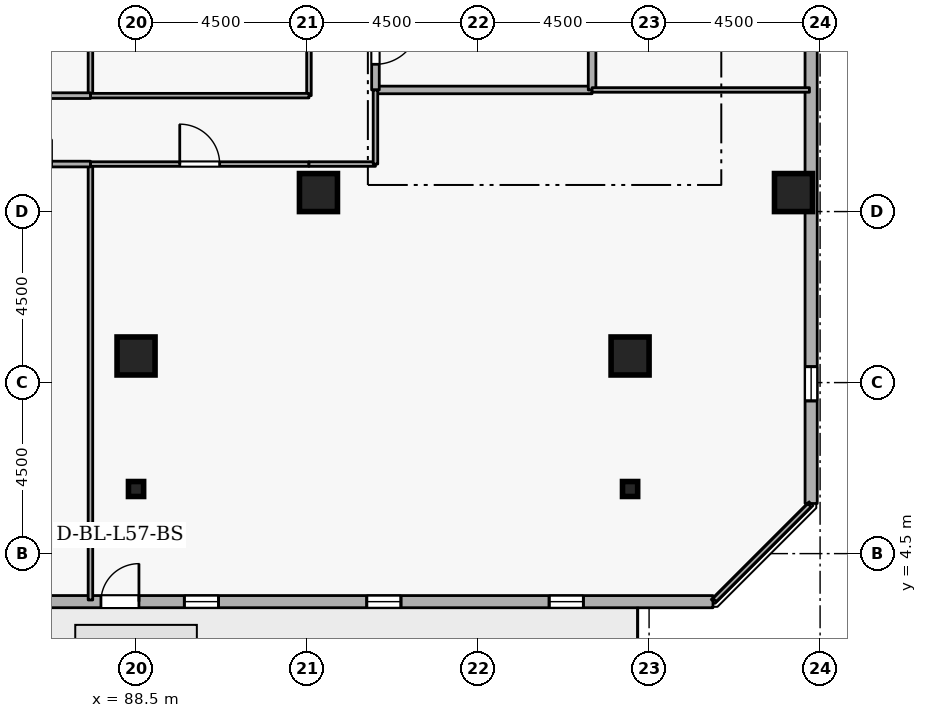
"""IFC4 building model, lengths in metres.
Left out: names, types, materials, properties, quantities, classifications, styles, units other than length and angle.
Written with IfcOpenShell. Run it as: python <this file> out.ifc"""

import sys

from ifc_helpers import new_model, si_unit, direction, frame, frame_2d, origin, origin_2d, place, context, subcontext, project, spatial, rectangle, i_section, extrude, element, fill, save


model = new_model("IFC4")
c1 = context("Model", 3, precision=1e-05, world=origin(), true_north=direction((0.0, 1.0)))
c2 = subcontext(c1, "Body", "Model", "MODEL_VIEW")
j1 = project(units=[si_unit("LENGTHUNIT", "METRE"), si_unit("PLANEANGLEUNIT", "RADIAN")], contexts=[c1])
p1 = place(None, origin())
s1 = spatial("IfcSite", under=j1, at=p1, CompositionType="ELEMENT")
p2 = place(p1, origin())
s2 = spatial("IfcBuilding", under=s1, at=p2, CompositionType="ELEMENT")
p3 = place(p2, frame((0.0, 0.0, 214.5)))
s3 = spatial("IfcBuildingStorey", under=s2, at=p3, CompositionType="ELEMENT", Elevation=214.5)
for number, where, z_axis, x_axis in (
    (1, (105.8, 14.0, 0.0), (0.0, 0.0, 1.0), (1.0, 0.0, 0.0)),
    (2, (101.5, 9.7, 0.0), (0.0, 0.0, 1.0), (1.0, 0.0, 0.0)),
    (3, (88.5, 9.7, 0.0), (0.0, 0.0, 1.0), (1.0, 0.0, 0.0)),
    (4, (93.3, 14.0, 0.0), (0.0, 0.0, 1.0), (1.0, 0.0, 0.0)),
):
    element("IfcColumn", number, at=place(p3, frame(where, z_axis=z_axis, x_axis=x_axis)), inside=s3, PredefinedType="COLUMN", context=c2, shape_type="SweptSolid", body=[
        extrude(rectangle(XDim=1.0, YDim=1.0, at=origin_2d()), origin(), (0.0, 0.0, 1.0), 3.6),
    ])
for number, where, z_axis, x_axis in (
    (5, (101.5, 6.2, 0.0), (0.0, 0.0, 1.0), (1.0, 0.0, 0.0)),
    (6, (88.5, 6.2, 0.0), (0.0, 0.0, 1.0), (1.0, 0.0, 0.0)),
):
    element("IfcColumn", number, at=place(p3, frame(where, z_axis=z_axis, x_axis=x_axis)), inside=s3, PredefinedType="COLUMN", context=c2, shape_type="SweptSolid", body=[
        extrude(i_section(OverallWidth=0.399, OverallDepth=0.394, WebThickness=0.023, FlangeThickness=0.037, FilletRadius=0.015, at=origin_2d()), origin(), (0.0, 0.0, 1.0), 3.6),
    ])
p4 = place(p3, frame((67.871, 3.237, 0.0), z_axis=(0.0, 0.0, 1.0), x_axis=(0.999999998513, -5.4540124e-05, 0.0)))
e7 = element("IfcWall", 7, at=p4, inside=s3, PredefinedType="STANDARD", context=c2, shape_type="SweptSolid", body=[
    extrude(rectangle(XDim=35.811, YDim=0.32, at=frame_2d((17.905, 0.0))), origin(), (0.0, 0.0, 1.0), 2.7),
])
p5 = place(p4, frame((19.706, 0.0, 0.0)))
e8 = element("IfcOpeningElement", 8, at=p5, cuts=e7, PredefinedType="OPENING", context=c2, shape_type="SweptSolid", body=[
    extrude(rectangle(XDim=1.0, YDim=2.08, at=frame_2d((0.5, 1.04))), frame((0.0, 0.17, 0.0), z_axis=(0.0, -1.0, 0.0), x_axis=(1.0, 0.0, 0.0)), (0.0, 0.0, 1.0), 0.34),
])
p6 = place(p4, frame((2.7, 0.0, 0.72)))
e9 = element("IfcOpeningElement", 9, at=p6, cuts=e7, PredefinedType="OPENING", context=c2, shape_type="SweptSolid", body=[
    extrude(rectangle(XDim=0.9, YDim=1.75, at=frame_2d((0.45, 0.875))), frame((0.0, 0.17, 0.0), z_axis=(0.0, -1.0, 0.0), x_axis=(1.0, 0.0, 0.0)), (0.0, 0.0, 1.0), 0.34),
])
p7 = place(p4, frame((7.5, 0.0, 0.72)))
e10 = element("IfcOpeningElement", 10, at=p7, cuts=e7, PredefinedType="OPENING", context=c2, shape_type="SweptSolid", body=[
    extrude(rectangle(XDim=0.9, YDim=1.75, at=frame_2d((0.45, 0.875))), frame((0.0, 0.17, 0.0), z_axis=(0.0, -1.0, 0.0), x_axis=(1.0, 0.0, 0.0)), (0.0, 0.0, 1.0), 0.34),
])
p8 = place(p4, frame((12.3, 0.0, 0.72)))
e11 = element("IfcOpeningElement", 11, at=p8, cuts=e7, PredefinedType="OPENING", context=c2, shape_type="SweptSolid", body=[
    extrude(rectangle(XDim=0.9, YDim=1.75, at=frame_2d((0.45, 0.875))), frame((0.0, 0.17, 0.0), z_axis=(0.0, -1.0, 0.0), x_axis=(1.0, 0.0, 0.0)), (0.0, 0.0, 1.0), 0.34),
])
p9 = place(p4, frame((17.1, 0.0, 0.72)))
e12 = element("IfcOpeningElement", 12, at=p9, cuts=e7, PredefinedType="OPENING", context=c2, shape_type="SweptSolid", body=[
    extrude(rectangle(XDim=0.9, YDim=1.75, at=frame_2d((0.45, 0.875))), frame((0.0, 0.17, 0.0), z_axis=(0.0, -1.0, 0.0), x_axis=(1.0, 0.0, 0.0)), (0.0, 0.0, 1.0), 0.34),
])
p10 = place(p4, frame((21.9, 0.0, 0.72)))
e13 = element("IfcOpeningElement", 13, at=p10, cuts=e7, PredefinedType="OPENING", context=c2, shape_type="SweptSolid", body=[
    extrude(rectangle(XDim=0.9, YDim=1.75, at=frame_2d((0.45, 0.875))), frame((0.0, 0.17, 0.0), z_axis=(0.0, -1.0, 0.0), x_axis=(1.0, 0.0, 0.0)), (0.0, 0.0, 1.0), 0.34),
])
p11 = place(p4, frame((26.7, 0.0, 0.72)))
e14 = element("IfcOpeningElement", 14, at=p11, cuts=e7, PredefinedType="OPENING", context=c2, shape_type="SweptSolid", body=[
    extrude(rectangle(XDim=0.9, YDim=1.75, at=frame_2d((0.45, 0.875))), frame((0.0, 0.17, 0.0), z_axis=(0.0, -1.0, 0.0), x_axis=(1.0, 0.0, 0.0)), (0.0, 0.0, 1.0), 0.34),
])
p12 = place(p4, frame((31.5, 0.0, 0.72)))
e15 = element("IfcOpeningElement", 15, at=p12, cuts=e7, PredefinedType="OPENING", context=c2, shape_type="SweptSolid", body=[
    extrude(rectangle(XDim=0.9, YDim=1.75, at=frame_2d((0.45, 0.875))), frame((0.0, 0.17, 0.0), z_axis=(0.0, -1.0, 0.0), x_axis=(1.0, 0.0, 0.0)), (0.0, 0.0, 1.0), 0.34),
])
p13 = place(p3, frame((106.265, 5.819, 0.0), z_axis=(0.0, 0.0, 1.0), x_axis=(-5.4540124e-05, 0.999999998513, 0.0)))
e16 = element("IfcWall", 16, at=p13, inside=s3, PredefinedType="STANDARD", context=c2, shape_type="SweptSolid", body=[
    extrude(rectangle(XDim=35.811, YDim=0.32, at=frame_2d((17.905, 0.0))), origin(), (0.0, 0.0, 1.0), 2.7),
])
p14 = place(p13, frame((2.7, 0.0, 0.72)))
e17 = element("IfcOpeningElement", 17, at=p14, cuts=e16, PredefinedType="OPENING", context=c2, shape_type="SweptSolid", body=[
    extrude(rectangle(XDim=0.9, YDim=1.75, at=frame_2d((0.45, 0.875))), frame((0.0, 0.17, 0.0), z_axis=(0.0, -1.0, 0.0), x_axis=(1.0, 0.0, 0.0)), (0.0, 0.0, 1.0), 0.34),
])
p15 = place(p13, frame((12.3, 0.0, 0.72)))
e18 = element("IfcOpeningElement", 18, at=p15, cuts=e16, PredefinedType="OPENING", context=c2, shape_type="SweptSolid", body=[
    extrude(rectangle(XDim=0.9, YDim=1.75, at=frame_2d((0.45, 0.875))), frame((0.0, 0.17, 0.0), z_axis=(0.0, -1.0, 0.0), x_axis=(1.0, 0.0, 0.0)), (0.0, 0.0, 1.0), 0.34),
])
p16 = place(p13, frame((17.1, 0.0, 0.72)))
e19 = element("IfcOpeningElement", 19, at=p16, cuts=e16, PredefinedType="OPENING", context=c2, shape_type="SweptSolid", body=[
    extrude(rectangle(XDim=0.9, YDim=1.75, at=frame_2d((0.45, 0.875))), frame((0.0, 0.17, 0.0), z_axis=(0.0, -1.0, 0.0), x_axis=(1.0, 0.0, 0.0)), (0.0, 0.0, 1.0), 0.34),
])
p17 = place(p13, frame((26.7, 0.0, 0.72)))
e20 = element("IfcOpeningElement", 20, at=p17, cuts=e16, PredefinedType="OPENING", context=c2, shape_type="SweptSolid", body=[
    extrude(rectangle(XDim=0.9, YDim=1.75, at=frame_2d((0.45, 0.875))), frame((0.0, 0.17, 0.0), z_axis=(0.0, -1.0, 0.0), x_axis=(1.0, 0.0, 0.0)), (0.0, 0.0, 1.0), 0.34),
])
p18 = place(p13, frame((31.5, 0.0, 0.72)))
e21 = element("IfcOpeningElement", 21, at=p18, cuts=e16, PredefinedType="OPENING", context=c2, shape_type="SweptSolid", body=[
    extrude(rectangle(XDim=0.9, YDim=1.75, at=frame_2d((0.45, 0.875))), frame((0.0, 0.17, 0.0), z_axis=(0.0, -1.0, 0.0), x_axis=(1.0, 0.0, 0.0)), (0.0, 0.0, 1.0), 0.34),
])
p19 = place(p3, frame((94.8, 16.7, 0.0), z_axis=(0.0, 0.0, 1.0), x_axis=(1.0, 0.0, 0.0)))
e22 = element("IfcWall", 22, at=p19, inside=s3, PredefinedType="STANDARD", context=c2, shape_type="SweptSolid", body=[
    extrude(rectangle(XDim=5.7, YDim=0.2, at=frame_2d((2.85, 0.0))), origin(), (0.0, 0.0, 1.0), 3.34),
])
p20 = place(p3, frame((100.5, 16.7, 0.0), z_axis=(0.0, 0.0, 1.0), x_axis=(0.0, 1.0, 0.0)))
e23 = element("IfcWall", 23, at=p20, inside=s3, PredefinedType="STANDARD", context=c2, shape_type="SweptSolid", body=[
    extrude(rectangle(XDim=2.5, YDim=0.2, at=frame_2d((1.25, 0.0))), origin(), (0.0, 0.0, 1.0), 3.34),
])
p21 = place(p3, frame((94.8, 19.2, 0.0), z_axis=(0.0, 0.0, 1.0), x_axis=(0.0, -1.0, 0.0)))
e24 = element("IfcWall", 24, at=p21, inside=s3, PredefinedType="STANDARD", context=c2, shape_type="SweptSolid", body=[
    extrude(rectangle(XDim=2.5, YDim=0.2, at=frame_2d((1.25, 0.0))), origin(), (0.0, 0.0, 1.0), 3.34),
])
p22 = place(p21, frame((0.675, 0.0, 0.0)))
e25 = element("IfcOpeningElement", 25, at=p22, cuts=e24, PredefinedType="OPENING", context=c2, shape_type="SweptSolid", body=[
    extrude(rectangle(XDim=1.15, YDim=2.1, at=frame_2d((0.575, 1.05))), frame((0.0, 0.11, 0.0), z_axis=(0.0, -1.0, 0.0), x_axis=(1.0, 0.0, 0.0)), (0.0, 0.0, 1.0), 0.22),
])
p23 = place(p3, frame((87.3, 3.28, 0.0), z_axis=(0.0, 0.0, 1.0), x_axis=(0.0, 1.0, 0.0)))
e26 = element("IfcWall", 26, at=p23, inside=s3, PredefinedType="PARTITIONING", context=c2, shape_type="SweptSolid", body=[
    extrude(rectangle(XDim=11.47, YDim=0.12, at=frame_2d((5.735, 0.0))), origin(), (0.0, 0.0, 1.0), 3.34),
])
p24 = place(p3, frame((87.3, 14.75, 0.0), z_axis=(0.0, 0.0, 1.0), x_axis=(1.0, 0.0, 0.0)))
e27 = element("IfcWall", 27, at=p24, inside=s3, PredefinedType="PARTITIONING", context=c2, shape_type="SweptSolid", body=[
    extrude(rectangle(XDim=5.75, YDim=0.12, at=frame_2d((2.875, 0.0))), origin(), (0.0, 0.0, 1.0), 3.34),
])
p25 = place(p24, frame((2.35, 0.0, 0.0)))
e28 = element("IfcOpeningElement", 28, at=p25, cuts=e27, PredefinedType="OPENING", context=c2, shape_type="SweptSolid", body=[
    extrude(rectangle(XDim=1.05, YDim=2.1, at=frame_2d((0.525, 1.05))), frame((0.0, 0.07, 0.0), z_axis=(0.0, -1.0, 0.0), x_axis=(1.0, 0.0, 0.0)), (0.0, 0.0, 1.0), 0.14),
])
p26 = place(p3, frame((93.05, 14.75, 0.0), z_axis=(0.0, 0.0, 1.0), x_axis=(1.0, 0.0, 0.0)))
e29 = element("IfcWall", 29, at=p26, inside=s3, PredefinedType="PARTITIONING", context=c2, shape_type="SweptSolid", body=[
    extrude(rectangle(XDim=1.75, YDim=0.12, at=frame_2d((0.875, 0.0))), origin(), (0.0, 0.0, 1.0), 3.34),
])
p27 = place(p3, frame((94.8, 14.75, 0.0), z_axis=(0.0, 0.0, 1.0), x_axis=(0.0, 1.0, 0.0)))
e30 = element("IfcWall", 30, at=p27, inside=s3, PredefinedType="PARTITIONING", context=c2, shape_type="SweptSolid", body=[
    extrude(rectangle(XDim=1.95, YDim=0.12, at=frame_2d((0.975, 0.0))), origin(), (0.0, 0.0, 1.0), 3.34),
])
p28 = place(p3, frame((100.5, 16.7, 0.0), z_axis=(0.0, 0.0, 1.0), x_axis=(1.0, 0.0, 0.0)))
e31 = element("IfcWall", 31, at=p28, inside=s3, PredefinedType="PARTITIONING", context=c2, shape_type="SweptSolid", body=[
    extrude(rectangle(XDim=5.72, YDim=0.12, at=frame_2d((2.86, 0.0))), origin(), (0.0, 0.0, 1.0), 3.34),
])
p29 = place(p3, frame((106.22, 5.775, 0.0), z_axis=(0.0, 0.0, 1.0), x_axis=(-0.707106781187, -0.707106781187, 0.0)))
e32 = element("IfcWall", 32, at=p29, inside=s3, PredefinedType="PARTITIONING", context=c2, shape_type="SweptSolid", body=[
    extrude(rectangle(XDim=3.528, YDim=0.12, at=frame_2d((1.764, 0.0))), origin(), (0.0, 0.0, 1.0), 3.34),
])
p30 = place(p3, frame((83.95, 14.75, 0.0), z_axis=(0.0, 0.0, 1.0), x_axis=(1.0, 0.0, 0.0)))
e33 = element("IfcWall", 33, at=p30, inside=s3, PredefinedType="PARTITIONING", context=c2, shape_type="SweptSolid", body=[
    extrude(rectangle(XDim=3.35, YDim=0.15, at=frame_2d((1.675, 0.0))), origin(), (0.0, 0.0, 1.0), 3.34),
])
p31 = place(p30, frame((1.025, 0.0, 0.0)))
e34 = element("IfcOpeningElement", 34, at=p31, cuts=e33, PredefinedType="OPENING", context=c2, shape_type="SweptSolid", body=[
    extrude(rectangle(XDim=1.3, YDim=2.12, at=frame_2d((0.65, 1.06))), frame((0.0, 0.085, 0.0), z_axis=(0.0, -1.0, 0.0), x_axis=(1.0, 0.0, 0.0)), (0.0, 0.0, 1.0), 0.17),
])
p32 = place(p3, frame((87.3, 16.55, 0.0), z_axis=(0.0, 0.0, 1.0), x_axis=(0.0, 1.0, 0.0)))
e35 = element("IfcWall", 35, at=p32, inside=s3, PredefinedType="PARTITIONING", context=c2, shape_type="SweptSolid", body=[
    extrude(rectangle(XDim=5.85, YDim=0.12, at=frame_2d((2.925, 0.0))), origin(), (0.0, 0.0, 1.0), 3.34),
])
p33 = place(p3, frame((93.05, 22.4, 0.0), z_axis=(0.0, 0.0, 1.0), x_axis=(0.0, -1.0, 0.0)))
e36 = element("IfcWall", 36, at=p33, inside=s3, PredefinedType="PARTITIONING", context=c2, shape_type="SweptSolid", body=[
    extrude(rectangle(XDim=5.85, YDim=0.12, at=frame_2d((2.925, 0.0))), origin(), (0.0, 0.0, 1.0), 3.34),
])
p34 = place(p33, frame((2.45, 0.0, 0.0)))
e37 = element("IfcOpeningElement", 37, at=p34, cuts=e36, PredefinedType="OPENING", context=c2, shape_type="SweptSolid", body=[
    extrude(rectangle(XDim=0.95, YDim=2.1, at=frame_2d((0.475, 1.05))), frame((0.0, 0.07, 0.0), z_axis=(0.0, -1.0, 0.0), x_axis=(1.0, 0.0, 0.0)), (0.0, 0.0, 1.0), 0.14),
])
p35 = place(p3, frame((93.05, 16.55, 0.0), z_axis=(0.0, 0.0, 1.0), x_axis=(-1.0, 0.0, 0.0)))
e38 = element("IfcWall", 38, at=p35, inside=s3, PredefinedType="PARTITIONING", context=c2, shape_type="SweptSolid", body=[
    extrude(rectangle(XDim=5.75, YDim=0.12, at=frame_2d((2.875, 0.0))), origin(), (0.0, 0.0, 1.0), 3.34),
])
p36 = place(p3, frame((87.3, 16.55, 0.0), z_axis=(0.0, 0.0, 1.0), x_axis=(-1.0, 0.0, 0.0)))
e39 = element("IfcWall", 39, at=p36, inside=s3, PredefinedType="PARTITIONING", context=c2, shape_type="SweptSolid", body=[
    extrude(rectangle(XDim=3.35, YDim=0.15, at=frame_2d((1.675, 0.0))), origin(), (0.0, 0.0, 1.0), 3.34),
])
p37 = place(p5, origin())
e40 = element("IfcDoor", 40, at=p37, inside=s3, OperationType="SINGLE_SWING_RIGHT", PredefinedType="DOOR", context=c2, shape_type="SweptSolid", body=[
    extrude(rectangle(XDim=1.0, YDim=2.08, at=frame_2d((0.5, 1.04))), frame((0.0, 0.025, 0.0), z_axis=(0.0, -1.0, 0.0), x_axis=(1.0, 0.0, 0.0)), (0.0, 0.0, 1.0), 0.05),
])
fill(e8, e40)
p38 = place(p10, origin())
e41 = element("IfcWindow", 41, at=p38, inside=s3, PartitioningType="SINGLE_PANEL", PredefinedType="WINDOW", context=c2, shape_type="SweptSolid", body=[
    extrude(rectangle(XDim=0.9, YDim=1.75, at=frame_2d((0.45, 0.875))), frame((0.0, 0.03, 0.0), z_axis=(0.0, -1.0, 0.0), x_axis=(1.0, 0.0, 0.0)), (0.0, 0.0, 1.0), 0.06),
])
fill(e13, e41)
p39 = place(p11, origin())
e42 = element("IfcWindow", 42, at=p39, inside=s3, PartitioningType="SINGLE_PANEL", PredefinedType="WINDOW", context=c2, shape_type="SweptSolid", body=[
    extrude(rectangle(XDim=0.9, YDim=1.75, at=frame_2d((0.45, 0.875))), frame((0.0, 0.03, 0.0), z_axis=(0.0, -1.0, 0.0), x_axis=(1.0, 0.0, 0.0)), (0.0, 0.0, 1.0), 0.06),
])
fill(e14, e42)
p40 = place(p12, origin())
e43 = element("IfcWindow", 43, at=p40, inside=s3, PartitioningType="SINGLE_PANEL", PredefinedType="WINDOW", context=c2, shape_type="SweptSolid", body=[
    extrude(rectangle(XDim=0.9, YDim=1.75, at=frame_2d((0.45, 0.875))), frame((0.0, 0.03, 0.0), z_axis=(0.0, -1.0, 0.0), x_axis=(1.0, 0.0, 0.0)), (0.0, 0.0, 1.0), 0.06),
])
fill(e15, e43)
p41 = place(p14, origin())
e44 = element("IfcWindow", 44, at=p41, inside=s3, PartitioningType="SINGLE_PANEL", PredefinedType="WINDOW", context=c2, shape_type="SweptSolid", body=[
    extrude(rectangle(XDim=0.9, YDim=1.75, at=frame_2d((0.45, 0.875))), frame((0.0, 0.03, 0.0), z_axis=(0.0, -1.0, 0.0), x_axis=(1.0, 0.0, 0.0)), (0.0, 0.0, 1.0), 0.06),
])
fill(e17, e44)
p42 = place(p22, origin())
e45 = element("IfcDoor", 45, at=p42, inside=s3, OperationType="SINGLE_SWING_LEFT", PredefinedType="DOOR", context=c2, shape_type="SweptSolid", body=[
    extrude(rectangle(XDim=1.15, YDim=2.1, at=frame_2d((0.575, 1.05))), frame((0.0, 0.025, 0.0), z_axis=(0.0, -1.0, 0.0), x_axis=(1.0, 0.0, 0.0)), (0.0, 0.0, 1.0), 0.05),
])
fill(e25, e45)
p43 = place(p25, origin())
e46 = element("IfcDoor", 46, at=p43, inside=s3, OperationType="SINGLE_SWING_LEFT", PredefinedType="DOOR", context=c2, shape_type="SweptSolid", body=[
    extrude(rectangle(XDim=1.05, YDim=2.1, at=frame_2d((0.525, 1.05))), frame((0.0, 0.025, 0.0), z_axis=(0.0, -1.0, 0.0), x_axis=(1.0, 0.0, 0.0)), (0.0, 0.0, 1.0), 0.05),
])
fill(e28, e46)
save(model, sys.argv[1])
